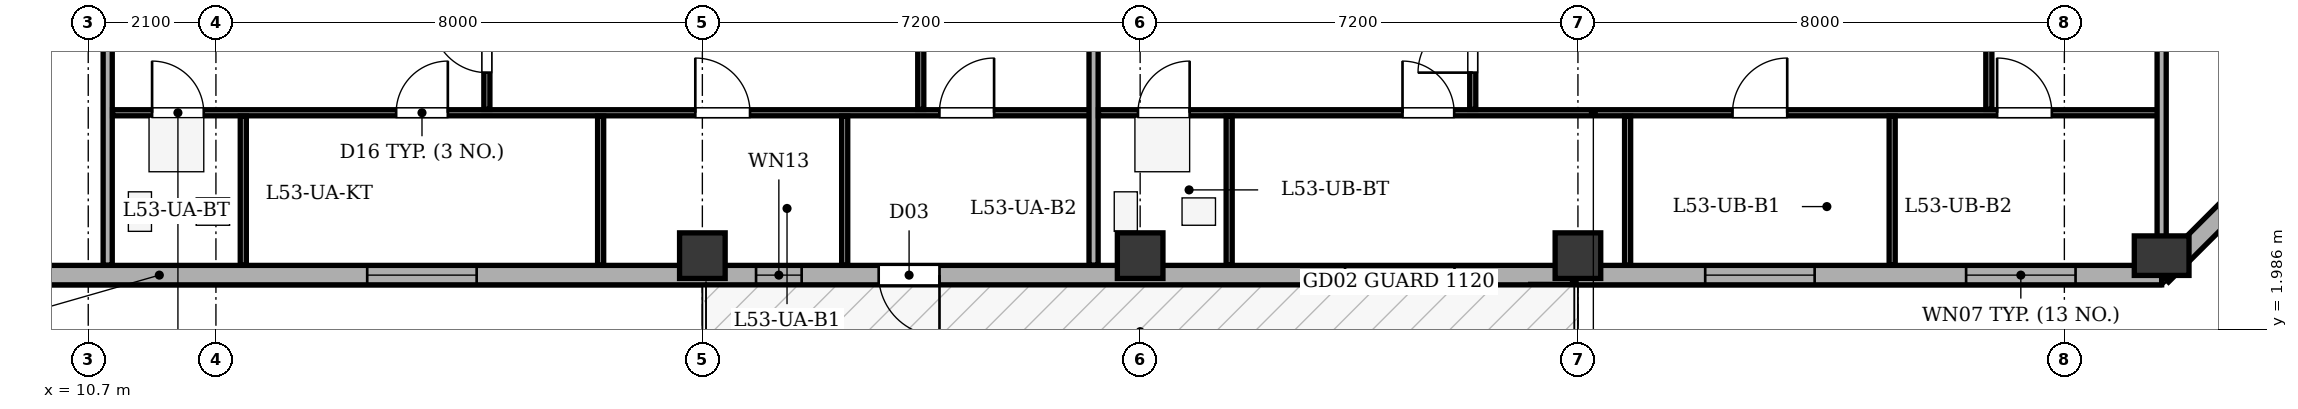
"""IFC4 building model, lengths in metres.
Left out: names, types, materials, properties, quantities, classifications, styles, units other than length and angle.
Written with IfcOpenShell. Run it as: python <this file> out.ifc"""

import sys

from ifc_helpers import new_model, si_unit, direction, frame, frame_2d, origin, origin_2d, place, context, subcontext, project, spatial, rectangle, extrude, element, fill, save


model = new_model("IFC4")
c1 = context("Model", 3, precision=1e-05, world=origin(), true_north=direction((0.0, 1.0)))
c2 = subcontext(c1, "Body", "Model", "MODEL_VIEW")
j1 = project(units=[si_unit("LENGTHUNIT", "METRE"), si_unit("PLANEANGLEUNIT", "RADIAN")], contexts=[c1])
p1 = place(None, origin())
s1 = spatial("IfcSite", under=j1, at=p1, CompositionType="ELEMENT")
p2 = place(p1, origin())
s2 = spatial("IfcBuilding", under=s1, at=p2, CompositionType="ELEMENT")
p3 = place(p2, frame((0.0, 0.0, 207.5)))
s3 = spatial("IfcBuildingStorey", under=s2, at=p3, CompositionType="ELEMENT", Elevation=207.5)
for number, where, z_axis, x_axis in (
    (1, (20.8, 3.2, 0.0), (0.0, 0.0, 1.0), (1.0, 0.0, 0.0)),
    (2, (28.0, 3.2, 0.0), (0.0, 0.0, 1.0), (1.0, 0.0, 0.0)),
    (3, (35.2, 3.2, 0.0), (0.0, 0.0, 1.0), (1.0, 0.0, 0.0)),
):
    element("IfcColumn", number, at=place(p3, frame(where, z_axis=z_axis, x_axis=x_axis)), inside=s3, PredefinedType="COLUMN", context=c2, shape_type="SweptSolid", body=[
        extrude(rectangle(XDim=0.75, YDim=0.75, at=origin_2d()), origin(), (0.0, 0.0, 1.0), 3.4),
    ])
p4 = place(p3, frame((44.8, 3.2, 0.0), z_axis=(0.0, 0.0, 1.0), x_axis=(1.0, 0.0, 0.0)))
e4 = element("IfcColumn", 4, at=p4, inside=s3, PredefinedType="COLUMN", context=c2, shape_type="SweptSolid", body=[
    extrude(rectangle(XDim=0.65, YDim=0.9, at=origin_2d()), origin(), (0.0, 0.0, 1.0), 3.4),
])
p5 = place(p3, frame((44.8, 2.88, 0.0), z_axis=(0.0, 0.0, 1.0), x_axis=(-1.0, 0.0, 0.0)))
e5 = element("IfcWall", 5, at=p5, inside=s3, PredefinedType="STANDARD", context=c2, shape_type="SweptSolid", body=[
    extrude(rectangle(XDim=36.0, YDim=0.32, at=frame_2d((18.0, 0.0))), origin(), (0.0, 0.0, 1.0), 2.725),
])
p6 = place(p5, frame((20.1, 0.0, 0.0)))
e6 = element("IfcOpeningElement", 6, at=p6, cuts=e5, PredefinedType="OPENING", context=c2, shape_type="SweptSolid", body=[
    extrude(rectangle(XDim=1.0, YDim=2.02, at=frame_2d((0.5, 1.01))), frame((0.0, 0.17, 0.0), z_axis=(0.0, -1.0, 0.0), x_axis=(1.0, 0.0, 0.0)), (0.0, 0.0, 1.0), 0.34),
])
p7 = place(p5, frame((1.416, 0.0, 0.75)))
e7 = element("IfcOpeningElement", 7, at=p7, cuts=e5, PredefinedType="OPENING", context=c2, shape_type="SweptSolid", body=[
    extrude(rectangle(XDim=1.8, YDim=1.7, at=frame_2d((0.9, 0.85))), frame((0.0, 0.17, 0.0), z_axis=(0.0, -1.0, 0.0), x_axis=(1.0, 0.0, 0.0)), (0.0, 0.0, 1.0), 0.34),
])
p8 = place(p5, frame((5.707, 0.0, 0.75)))
e8 = element("IfcOpeningElement", 8, at=p8, cuts=e5, PredefinedType="OPENING", context=c2, shape_type="SweptSolid", body=[
    extrude(rectangle(XDim=1.8, YDim=1.7, at=frame_2d((0.9, 0.85))), frame((0.0, 0.17, 0.0), z_axis=(0.0, -1.0, 0.0), x_axis=(1.0, 0.0, 0.0)), (0.0, 0.0, 1.0), 0.34),
])
p9 = place(p5, frame((11.63, 0.0, 0.75)))
e9 = element("IfcOpeningElement", 9, at=p9, cuts=e5, PredefinedType="OPENING", context=c2, shape_type="SweptSolid", body=[
    extrude(rectangle(XDim=1.8, YDim=1.7, at=frame_2d((0.9, 0.85))), frame((0.0, 0.17, 0.0), z_axis=(0.0, -1.0, 0.0), x_axis=(1.0, 0.0, 0.0)), (0.0, 0.0, 1.0), 0.34),
])
p10 = place(p5, frame((27.712, 0.0, 0.75)))
e10 = element("IfcOpeningElement", 10, at=p10, cuts=e5, PredefinedType="OPENING", context=c2, shape_type="SweptSolid", body=[
    extrude(rectangle(XDim=1.8, YDim=1.7, at=frame_2d((0.9, 0.85))), frame((0.0, 0.17, 0.0), z_axis=(0.0, -1.0, 0.0), x_axis=(1.0, 0.0, 0.0)), (0.0, 0.0, 1.0), 0.34),
])
p11 = place(p5, frame((22.367, 0.0, 0.75)))
e11 = element("IfcOpeningElement", 11, at=p11, cuts=e5, PredefinedType="OPENING", context=c2, shape_type="SweptSolid", body=[
    extrude(rectangle(XDim=0.75, YDim=1.45, at=frame_2d((0.375, 0.725))), frame((0.0, 0.17, 0.0), z_axis=(0.0, -1.0, 0.0), x_axis=(1.0, 0.0, 0.0)), (0.0, 0.0, 1.0), 0.34),
])
p12 = place(p3, frame((49.12, 7.2, 0.0), z_axis=(0.0, 0.0, 1.0), x_axis=(-0.707106781187, -0.707106781187, 0.0)))
e12 = element("IfcWall", 12, at=p12, inside=s3, PredefinedType="STANDARD", context=c2, shape_type="SweptSolid", body=[
    extrude(rectangle(XDim=6.11, YDim=0.32, at=frame_2d((3.055, 0.0))), origin(), (0.0, 0.0, 1.0), 2.725),
])
p13 = place(p12, frame((2.355, 0.0, 0.75)))
e13 = element("IfcOpeningElement", 13, at=p13, cuts=e12, PredefinedType="OPENING", context=c2, shape_type="SweptSolid", body=[
    extrude(rectangle(XDim=1.4, YDim=1.65, at=frame_2d((0.7, 0.825))), frame((0.0, 0.17, 0.0), z_axis=(0.0, -1.0, 0.0), x_axis=(1.0, 0.0, 0.0)), (0.0, 0.0, 1.0), 0.34),
])
p14 = place(p3, frame((11.02, 3.045, 0.0), z_axis=(0.0, 0.0, 1.0), x_axis=(0.0, 1.0, 0.0)))
e14 = element("IfcWall", 14, at=p14, inside=s3, PredefinedType="PARTITIONING", context=c2, shape_type="SweptSolid", body=[
    extrude(rectangle(XDim=15.255, YDim=0.15, at=frame_2d((7.627, 0.0))), origin(), (0.0, 0.0, 1.0), 3.1),
])
p15 = place(p3, frame((11.1, 5.55, 0.0), z_axis=(0.0, 0.0, 1.0), x_axis=(1.0, 0.0, 0.0)))
e15 = element("IfcWall", 15, at=p15, inside=s3, PredefinedType="PARTITIONING", context=c2, shape_type="SweptSolid", body=[
    extrude(rectangle(XDim=16.174, YDim=0.1, at=frame_2d((8.087, 0.0))), origin(), (0.0, 0.0, 1.0), 3.1),
])
p16 = place(p15, frame((0.65, 0.0, 0.0)))
e16 = element("IfcOpeningElement", 16, at=p16, cuts=e15, PredefinedType="OPENING", context=c2, shape_type="SweptSolid", body=[
    extrude(rectangle(XDim=0.85, YDim=2.05, at=frame_2d((0.425, 1.025))), frame((0.0, 0.06, 0.0), z_axis=(0.0, -1.0, 0.0), x_axis=(1.0, 0.0, 0.0)), (0.0, 0.0, 1.0), 0.12),
])
p17 = place(p15, frame((4.664, 0.0, 0.0)))
e17 = element("IfcOpeningElement", 17, at=p17, cuts=e15, PredefinedType="OPENING", context=c2, shape_type="SweptSolid", body=[
    extrude(rectangle(XDim=0.85, YDim=2.05, at=frame_2d((0.425, 1.025))), frame((0.0, 0.06, 0.0), z_axis=(0.0, -1.0, 0.0), x_axis=(1.0, 0.0, 0.0)), (0.0, 0.0, 1.0), 0.12),
])
p18 = place(p15, frame((9.584, 0.0, 0.0)))
e18 = element("IfcOpeningElement", 18, at=p18, cuts=e15, PredefinedType="OPENING", context=c2, shape_type="SweptSolid", body=[
    extrude(rectangle(XDim=0.9, YDim=2.05, at=frame_2d((0.45, 1.025))), frame((0.0, 0.06, 0.0), z_axis=(0.0, -1.0, 0.0), x_axis=(1.0, 0.0, 0.0)), (0.0, 0.0, 1.0), 0.12),
])
p19 = place(p15, frame((13.598, 0.0, 0.0)))
e19 = element("IfcOpeningElement", 19, at=p19, cuts=e15, PredefinedType="OPENING", context=c2, shape_type="SweptSolid", body=[
    extrude(rectangle(XDim=0.9, YDim=2.05, at=frame_2d((0.45, 1.025))), frame((0.0, 0.06, 0.0), z_axis=(0.0, -1.0, 0.0), x_axis=(1.0, 0.0, 0.0)), (0.0, 0.0, 1.0), 0.12),
])
p20 = place(p3, frame((24.392, 5.605, 0.0), z_axis=(0.0, 0.0, 1.0), x_axis=(0.0, 1.0, 0.0)))
e20 = element("IfcWall", 20, at=p20, inside=s3, PredefinedType="PARTITIONING", context=c2, shape_type="SweptSolid", body=[
    extrude(rectangle(XDim=12.695, YDim=0.1, at=frame_2d((6.348, 0.0))), origin(), (0.0, 0.0, 1.0), 3.1),
])
p21 = place(p20, frame((5.91, 0.0, 0.0)))
e21 = element("IfcOpeningElement", 21, at=p21, cuts=e20, PredefinedType="OPENING", context=c2, shape_type="SweptSolid", body=[
    extrude(rectangle(XDim=0.9, YDim=2.05, at=frame_2d((0.45, 1.025))), frame((0.0, 0.06, 0.0), z_axis=(0.0, -1.0, 0.0), x_axis=(1.0, 0.0, 0.0)), (0.0, 0.0, 1.0), 0.12),
])
p22 = place(p3, frame((17.256, 5.605, 0.0), z_axis=(0.0, 0.0, 1.0), x_axis=(0.0, 1.0, 0.0)))
e22 = element("IfcWall", 22, at=p22, inside=s3, PredefinedType="PARTITIONING", context=c2, shape_type="SweptSolid", body=[
    extrude(rectangle(XDim=12.695, YDim=0.1, at=frame_2d((6.348, 0.0))), origin(), (0.0, 0.0, 1.0), 3.1),
])
p23 = place(p22, frame((0.605, 0.0, 0.0)))
e23 = element("IfcOpeningElement", 23, at=p23, cuts=e22, PredefinedType="OPENING", context=c2, shape_type="SweptSolid", body=[
    extrude(rectangle(XDim=0.9, YDim=2.05, at=frame_2d((0.45, 1.025))), frame((0.0, 0.06, 0.0), z_axis=(0.0, -1.0, 0.0), x_axis=(1.0, 0.0, 0.0)), (0.0, 0.0, 1.0), 0.12),
])
for number, where, z_axis, x_axis in (
    (24, (13.25, 3.045, 0.0), (0.0, 0.0, 1.0), (0.0, 1.0, 0.0)),
    (25, (19.127, 3.045, 0.0), (0.0, 0.0, 1.0), (0.0, 1.0, 0.0)),
    (26, (23.141, 3.045, 0.0), (0.0, 0.0, 1.0), (0.0, 1.0, 0.0)),
):
    element("IfcWall", number, at=place(p3, frame(where, z_axis=z_axis, x_axis=x_axis)), inside=s3, PredefinedType="PARTITIONING", context=c2, shape_type="SweptSolid", body=[
        extrude(rectangle(XDim=2.45, YDim=0.1, at=frame_2d((1.225, 0.0))), origin(), (0.0, 0.0, 1.0), 3.1),
    ])
p24 = place(p3, frame((27.234, 3.045, 0.0), z_axis=(0.0, 0.0, 1.0), x_axis=(0.0, 1.0, 0.0)))
e27 = element("IfcWall", 27, at=p24, inside=s3, PredefinedType="PARTITIONING", context=c2, shape_type="SweptSolid", body=[
    extrude(rectangle(XDim=15.255, YDim=0.15, at=frame_2d((7.627, 0.0))), origin(), (0.0, 0.0, 1.0), 3.1),
])
p25 = place(p3, frame((27.314, 5.55, 0.0), z_axis=(0.0, 0.0, 1.0), x_axis=(1.0, 0.0, 0.0)))
e28 = element("IfcWall", 28, at=p25, inside=s3, PredefinedType="PARTITIONING", context=c2, shape_type="SweptSolid", body=[
    extrude(rectangle(XDim=17.526, YDim=0.1, at=frame_2d((8.763, 0.0))), origin(), (0.0, 0.0, 1.0), 3.1),
])
p26 = place(p25, frame((0.65, 0.0, 0.0)))
e29 = element("IfcOpeningElement", 29, at=p26, cuts=e28, PredefinedType="OPENING", context=c2, shape_type="SweptSolid", body=[
    extrude(rectangle(XDim=0.85, YDim=2.05, at=frame_2d((0.425, 1.025))), frame((0.0, 0.06, 0.0), z_axis=(0.0, -1.0, 0.0), x_axis=(1.0, 0.0, 0.0)), (0.0, 0.0, 1.0), 0.12),
])
p27 = place(p25, frame((5.001, 0.0, 0.0)))
e30 = element("IfcOpeningElement", 30, at=p27, cuts=e28, PredefinedType="OPENING", context=c2, shape_type="SweptSolid", body=[
    extrude(rectangle(XDim=0.85, YDim=2.05, at=frame_2d((0.425, 1.025))), frame((0.0, 0.06, 0.0), z_axis=(0.0, -1.0, 0.0), x_axis=(1.0, 0.0, 0.0)), (0.0, 0.0, 1.0), 0.12),
])
p28 = place(p25, frame((10.428, 0.0, 0.0)))
e31 = element("IfcOpeningElement", 31, at=p28, cuts=e28, PredefinedType="OPENING", context=c2, shape_type="SweptSolid", body=[
    extrude(rectangle(XDim=0.9, YDim=2.05, at=frame_2d((0.45, 1.025))), frame((0.0, 0.06, 0.0), z_axis=(0.0, -1.0, 0.0), x_axis=(1.0, 0.0, 0.0)), (0.0, 0.0, 1.0), 0.12),
])
p29 = place(p25, frame((14.78, 0.0, 0.0)))
e32 = element("IfcOpeningElement", 32, at=p29, cuts=e28, PredefinedType="OPENING", context=c2, shape_type="SweptSolid", body=[
    extrude(rectangle(XDim=0.9, YDim=2.05, at=frame_2d((0.45, 1.025))), frame((0.0, 0.06, 0.0), z_axis=(0.0, -1.0, 0.0), x_axis=(1.0, 0.0, 0.0)), (0.0, 0.0, 1.0), 0.12),
])
p30 = place(p3, frame((41.958, 5.605, 0.0), z_axis=(0.0, 0.0, 1.0), x_axis=(0.0, 1.0, 0.0)))
e33 = element("IfcWall", 33, at=p30, inside=s3, PredefinedType="PARTITIONING", context=c2, shape_type="SweptSolid", body=[
    extrude(rectangle(XDim=12.695, YDim=0.1, at=frame_2d((6.348, 0.0))), origin(), (0.0, 0.0, 1.0), 2.725),
])
p31 = place(p30, frame((5.91, 0.0, 0.0)))
e34 = element("IfcOpeningElement", 34, at=p31, cuts=e33, PredefinedType="OPENING", context=c2, shape_type="SweptSolid", body=[
    extrude(rectangle(XDim=0.9, YDim=2.05, at=frame_2d((0.45, 1.025))), frame((0.0, 0.06, 0.0), z_axis=(0.0, -1.0, 0.0), x_axis=(1.0, 0.0, 0.0)), (0.0, 0.0, 1.0), 0.12),
])
p32 = place(p3, frame((33.47, 5.605, 0.0), z_axis=(0.0, 0.0, 1.0), x_axis=(0.0, 1.0, 0.0)))
e35 = element("IfcWall", 35, at=p32, inside=s3, PredefinedType="PARTITIONING", context=c2, shape_type="SweptSolid", body=[
    extrude(rectangle(XDim=12.695, YDim=0.1, at=frame_2d((6.348, 0.0))), origin(), (0.0, 0.0, 1.0), 2.725),
])
p33 = place(p32, frame((0.605, 0.0, 0.0)))
e36 = element("IfcOpeningElement", 36, at=p33, cuts=e35, PredefinedType="OPENING", context=c2, shape_type="SweptSolid", body=[
    extrude(rectangle(XDim=0.9, YDim=2.05, at=frame_2d((0.45, 1.025))), frame((0.0, 0.06, 0.0), z_axis=(0.0, -1.0, 0.0), x_axis=(1.0, 0.0, 0.0)), (0.0, 0.0, 1.0), 0.12),
])
for number, where, z_axis, x_axis in (
    (37, (29.464, 3.045, 0.0), (0.0, 0.0, 1.0), (0.0, 1.0, 0.0)),
    (38, (36.017, 3.045, 0.0), (0.0, 0.0, 1.0), (0.0, 1.0, 0.0)),
):
    element("IfcWall", number, at=place(p3, frame(where, z_axis=z_axis, x_axis=x_axis)), inside=s3, PredefinedType="PARTITIONING", context=c2, shape_type="SweptSolid", body=[
        extrude(rectangle(XDim=2.45, YDim=0.1, at=frame_2d((1.225, 0.0))), origin(), (0.0, 0.0, 1.0), 3.1),
    ])
p34 = place(p3, frame((40.368, 3.045, 0.0), z_axis=(0.0, 0.0, 1.0), x_axis=(0.0, 1.0, 0.0)))
e39 = element("IfcWall", 39, at=p34, inside=s3, PredefinedType="PARTITIONING", context=c2, shape_type="SweptSolid", body=[
    extrude(rectangle(XDim=2.45, YDim=0.1, at=frame_2d((1.225, 0.0))), origin(), (0.0, 0.0, 1.0), 2.725),
])
p35 = place(p3, frame((44.8, 3.045, 0.0), z_axis=(0.0, 0.0, 1.0), x_axis=(0.0, 1.0, 0.0)))
e40 = element("IfcWall", 40, at=p35, inside=s3, PredefinedType="PARTITIONING", context=c2, shape_type="SweptSolid", body=[
    extrude(rectangle(XDim=15.255, YDim=0.15, at=frame_2d((7.627, 0.0))), origin(), (0.0, 0.0, 1.0), 3.1),
])
p36 = place(p6, origin())
e41 = element("IfcDoor", 41, at=p36, inside=s3, OperationType="SINGLE_SWING_LEFT", PredefinedType="DOOR", context=c2, shape_type="SweptSolid", body=[
    extrude(rectangle(XDim=1.0, YDim=2.02, at=frame_2d((0.5, 1.01))), frame((0.0, 0.025, 0.0), z_axis=(0.0, -1.0, 0.0), x_axis=(1.0, 0.0, 0.0)), (0.0, 0.0, 1.0), 0.05),
])
fill(e6, e41)
p37 = place(p7, origin())
e42 = element("IfcWindow", 42, at=p37, inside=s3, PartitioningType="SINGLE_PANEL", PredefinedType="WINDOW", context=c2, shape_type="SweptSolid", body=[
    extrude(rectangle(XDim=1.8, YDim=1.7, at=frame_2d((0.9, 0.85))), frame((0.0, -0.01, 0.0), z_axis=(0.0, -1.0, 0.0), x_axis=(1.0, 0.0, 0.0)), (0.0, 0.0, 1.0), 0.06),
])
fill(e7, e42)
p38 = place(p8, origin())
e43 = element("IfcWindow", 43, at=p38, inside=s3, PartitioningType="SINGLE_PANEL", PredefinedType="WINDOW", context=c2, shape_type="SweptSolid", body=[
    extrude(rectangle(XDim=1.8, YDim=1.7, at=frame_2d((0.9, 0.85))), frame((0.0, -0.01, 0.0), z_axis=(0.0, -1.0, 0.0), x_axis=(1.0, 0.0, 0.0)), (0.0, 0.0, 1.0), 0.06),
])
fill(e8, e43)
p39 = place(p9, origin())
e44 = element("IfcWindow", 44, at=p39, inside=s3, PartitioningType="SINGLE_PANEL", PredefinedType="WINDOW", context=c2, shape_type="SweptSolid", body=[
    extrude(rectangle(XDim=1.8, YDim=1.7, at=frame_2d((0.9, 0.85))), frame((0.0, -0.01, 0.0), z_axis=(0.0, -1.0, 0.0), x_axis=(1.0, 0.0, 0.0)), (0.0, 0.0, 1.0), 0.06),
])
fill(e9, e44)
p40 = place(p10, origin())
e45 = element("IfcWindow", 45, at=p40, inside=s3, PartitioningType="SINGLE_PANEL", PredefinedType="WINDOW", context=c2, shape_type="SweptSolid", body=[
    extrude(rectangle(XDim=1.8, YDim=1.7, at=frame_2d((0.9, 0.85))), frame((0.0, -0.01, 0.0), z_axis=(0.0, -1.0, 0.0), x_axis=(1.0, 0.0, 0.0)), (0.0, 0.0, 1.0), 0.06),
])
fill(e10, e45)
p41 = place(p11, origin())
e46 = element("IfcWindow", 46, at=p41, inside=s3, PartitioningType="SINGLE_PANEL", PredefinedType="WINDOW", context=c2, shape_type="SweptSolid", body=[
    extrude(rectangle(XDim=0.75, YDim=1.45, at=frame_2d((0.375, 0.725))), frame((0.0, -0.01, 0.0), z_axis=(0.0, -1.0, 0.0), x_axis=(1.0, 0.0, 0.0)), (0.0, 0.0, 1.0), 0.06),
])
fill(e11, e46)
p42 = place(p23, origin())
e47 = element("IfcDoor", 47, at=p42, inside=s3, OperationType="SINGLE_SWING_RIGHT", PredefinedType="DOOR", context=c2, shape_type="SweptSolid", body=[
    extrude(rectangle(XDim=0.9, YDim=2.05, at=frame_2d((0.45, 1.025))), frame((0.0, 0.025, 0.0), z_axis=(0.0, -1.0, 0.0), x_axis=(1.0, 0.0, 0.0)), (0.0, 0.0, 1.0), 0.05),
])
fill(e23, e47)
p43 = place(p16, origin())
e48 = element("IfcDoor", 48, at=p43, inside=s3, OperationType="SINGLE_SWING_LEFT", PredefinedType="DOOR", context=c2, shape_type="SweptSolid", body=[
    extrude(rectangle(XDim=0.85, YDim=2.05, at=frame_2d((0.425, 1.025))), frame((0.0, 0.025, 0.0), z_axis=(0.0, -1.0, 0.0), x_axis=(1.0, 0.0, 0.0)), (0.0, 0.0, 1.0), 0.05),
])
fill(e16, e48)
p44 = place(p17, origin())
e49 = element("IfcDoor", 49, at=p44, inside=s3, OperationType="SINGLE_SWING_RIGHT", PredefinedType="DOOR", context=c2, shape_type="SweptSolid", body=[
    extrude(rectangle(XDim=0.85, YDim=2.05, at=frame_2d((0.425, 1.025))), frame((0.0, 0.025, 0.0), z_axis=(0.0, -1.0, 0.0), x_axis=(1.0, 0.0, 0.0)), (0.0, 0.0, 1.0), 0.05),
])
fill(e17, e49)
p45 = place(p18, origin())
e50 = element("IfcDoor", 50, at=p45, inside=s3, OperationType="SINGLE_SWING_LEFT", PredefinedType="DOOR", context=c2, shape_type="SweptSolid", body=[
    extrude(rectangle(XDim=0.9, YDim=2.05, at=frame_2d((0.45, 1.025))), frame((0.0, 0.025, 0.0), z_axis=(0.0, -1.0, 0.0), x_axis=(1.0, 0.0, 0.0)), (0.0, 0.0, 1.0), 0.05),
])
fill(e18, e50)
p46 = place(p19, origin())
e51 = element("IfcDoor", 51, at=p46, inside=s3, OperationType="SINGLE_SWING_RIGHT", PredefinedType="DOOR", context=c2, shape_type="SweptSolid", body=[
    extrude(rectangle(XDim=0.9, YDim=2.05, at=frame_2d((0.45, 1.025))), frame((0.0, 0.025, 0.0), z_axis=(0.0, -1.0, 0.0), x_axis=(1.0, 0.0, 0.0)), (0.0, 0.0, 1.0), 0.05),
])
fill(e19, e51)
p47 = place(p33, origin())
e52 = element("IfcDoor", 52, at=p47, inside=s3, OperationType="SINGLE_SWING_LEFT", PredefinedType="DOOR", context=c2, shape_type="SweptSolid", body=[
    extrude(rectangle(XDim=0.9, YDim=2.05, at=frame_2d((0.45, 1.025))), frame((0.0, 0.025, 0.0), z_axis=(0.0, -1.0, 0.0), x_axis=(1.0, 0.0, 0.0)), (0.0, 0.0, 1.0), 0.05),
])
fill(e36, e52)
p48 = place(p26, origin())
e53 = element("IfcDoor", 53, at=p48, inside=s3, OperationType="SINGLE_SWING_RIGHT", PredefinedType="DOOR", context=c2, shape_type="SweptSolid", body=[
    extrude(rectangle(XDim=0.85, YDim=2.05, at=frame_2d((0.425, 1.025))), frame((0.0, 0.025, 0.0), z_axis=(0.0, -1.0, 0.0), x_axis=(1.0, 0.0, 0.0)), (0.0, 0.0, 1.0), 0.05),
])
fill(e29, e53)
p49 = place(p27, origin())
e54 = element("IfcDoor", 54, at=p49, inside=s3, OperationType="SINGLE_SWING_LEFT", PredefinedType="DOOR", context=c2, shape_type="SweptSolid", body=[
    extrude(rectangle(XDim=0.85, YDim=2.05, at=frame_2d((0.425, 1.025))), frame((0.0, 0.025, 0.0), z_axis=(0.0, -1.0, 0.0), x_axis=(1.0, 0.0, 0.0)), (0.0, 0.0, 1.0), 0.05),
])
fill(e30, e54)
p50 = place(p28, origin())
e55 = element("IfcDoor", 55, at=p50, inside=s3, OperationType="SINGLE_SWING_RIGHT", PredefinedType="DOOR", context=c2, shape_type="SweptSolid", body=[
    extrude(rectangle(XDim=0.9, YDim=2.05, at=frame_2d((0.45, 1.025))), frame((0.0, 0.025, 0.0), z_axis=(0.0, -1.0, 0.0), x_axis=(1.0, 0.0, 0.0)), (0.0, 0.0, 1.0), 0.05),
])
fill(e31, e55)
p51 = place(p29, origin())
e56 = element("IfcDoor", 56, at=p51, inside=s3, OperationType="SINGLE_SWING_LEFT", PredefinedType="DOOR", context=c2, shape_type="SweptSolid", body=[
    extrude(rectangle(XDim=0.9, YDim=2.05, at=frame_2d((0.45, 1.025))), frame((0.0, 0.025, 0.0), z_axis=(0.0, -1.0, 0.0), x_axis=(1.0, 0.0, 0.0)), (0.0, 0.0, 1.0), 0.05),
])
fill(e32, e56)
save(model, sys.argv[1])
